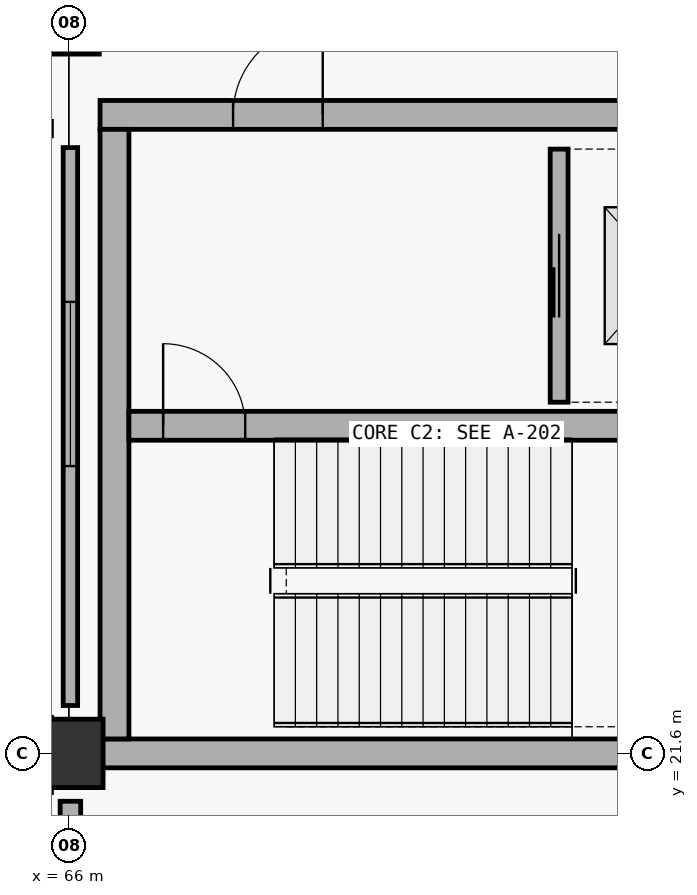
"""IFC4 building model, lengths in metres.
Left out: names, types, materials, properties, quantities, classifications, styles, units other than length and angle.
Written with IfcOpenShell. Run it as: python <this file> out.ifc"""

import sys

from ifc_helpers import new_model, si_unit, direction, frame, frame_2d, origin, origin_2d, place, context, subcontext, project, spatial, rectangle, extrude, element, fill, save


model = new_model("IFC4")
c1 = context("Model", 3, precision=1e-05, world=origin(), true_north=direction((0.0, 1.0)))
c2 = subcontext(c1, "Body", "Model", "MODEL_VIEW")
j1 = project(units=[si_unit("LENGTHUNIT", "METRE"), si_unit("PLANEANGLEUNIT", "RADIAN")], contexts=[c1])
p1 = place(None, origin())
s1 = spatial("IfcSite", under=j1, at=p1, CompositionType="ELEMENT")
p2 = place(p1, origin())
s2 = spatial("IfcBuilding", under=s1, at=p2, CompositionType="ELEMENT")
p3 = place(p2, frame((0.0, 0.0, 5.4)))
s3 = spatial("IfcBuildingStorey", under=s2, at=p3, CompositionType="ELEMENT", Elevation=5.4)
p4 = place(p3, frame((66.0, 21.6, 0.0), z_axis=(0.0, 0.0, 1.0), x_axis=(1.0, 0.0, 0.0)))
e1 = element("IfcColumn", 1, at=p4, inside=s3, PredefinedType="COLUMN", context=c2, shape_type="SweptSolid", body=[
    extrude(rectangle(XDim=0.9, YDim=0.9, at=origin_2d()), origin(), (0.0, 0.0, 1.0), 5.1),
])
p5 = place(p3, frame((66.0, 31.2, 0.0), z_axis=(0.0, 0.0, 1.0), x_axis=(1.0, 0.0, 0.0)))
e2 = element("IfcColumn", 2, at=p5, inside=s3, PredefinedType="COLUMN", context=c2, shape_type="SweptSolid", body=[
    extrude(rectangle(XDim=0.8, YDim=0.8, at=origin_2d()), origin(), (0.0, 0.0, 1.0), 5.1),
])
p6 = place(p3, frame((66.41, 21.6, 0.0), z_axis=(0.0, 0.0, 1.0), x_axis=(1.0, 0.0, 0.0)))
e3 = element("IfcWall", 3, at=p6, inside=s3, PredefinedType="SHEAR", context=c2, shape_type="SweptSolid", body=[
    extrude(rectangle(XDim=9.38, YDim=0.38, at=frame_2d((4.69, 0.0))), origin(), (0.0, 0.0, 1.0), 5.1),
])
p7 = place(p3, frame((66.41, 30.0, 0.0), z_axis=(0.0, 0.0, 1.0), x_axis=(1.0, 0.0, 0.0)))
e4 = element("IfcWall", 4, at=p7, inside=s3, PredefinedType="SHEAR", context=c2, shape_type="SweptSolid", body=[
    extrude(rectangle(XDim=9.38, YDim=0.38, at=frame_2d((4.69, 0.0))), origin(), (0.0, 0.0, 1.0), 5.1),
])
p8 = place(p7, frame((1.75, 0.0, 0.0)))
e5 = element("IfcOpeningElement", 5, at=p8, cuts=e4, PredefinedType="OPENING", context=c2, shape_type="SweptSolid", body=[
    extrude(rectangle(XDim=1.18, YDim=2.24, at=frame_2d((0.59, 1.12))), frame((0.0, 0.2, 0.0), z_axis=(0.0, -1.0, 0.0), x_axis=(1.0, 0.0, 0.0)), (0.0, 0.0, 1.0), 0.4),
])
p9 = place(p3, frame((66.6, 21.79, 0.0), z_axis=(0.0, 0.0, 1.0), x_axis=(0.0, 1.0, 0.0)))
e6 = element("IfcWall", 6, at=p9, inside=s3, PredefinedType="SHEAR", context=c2, shape_type="SweptSolid", body=[
    extrude(rectangle(XDim=8.02, YDim=0.38, at=frame_2d((4.01, 0.0))), origin(), (0.0, 0.0, 1.0), 5.1),
])
p10 = place(p3, frame((66.79, 25.91, 0.0), z_axis=(0.0, 0.0, 1.0), x_axis=(1.0, 0.0, 0.0)))
e7 = element("IfcWall", 7, at=p10, inside=s3, PredefinedType="SHEAR", context=c2, shape_type="SweptSolid", body=[
    extrude(rectangle(XDim=8.62, YDim=0.38, at=frame_2d((4.31, 0.0))), origin(), (0.0, 0.0, 1.0), 5.1),
])
p11 = place(p10, frame((0.45, 0.0, 0.0)))
e8 = element("IfcOpeningElement", 8, at=p11, cuts=e7, PredefinedType="OPENING", context=c2, shape_type="SweptSolid", body=[
    extrude(rectangle(XDim=1.08, YDim=2.18, at=frame_2d((0.54, 1.09))), frame((0.0, 0.2, 0.0), z_axis=(0.0, -1.0, 0.0), x_axis=(1.0, 0.0, 0.0)), (0.0, 0.0, 1.0), 0.4),
])
p12 = place(p3, frame((72.45, 26.22, 0.0), z_axis=(0.0, 0.0, 1.0), x_axis=(0.0, 1.0, 0.0)))
e9 = element("IfcWall", 9, at=p12, inside=s3, PredefinedType="PARTITIONING", context=c2, shape_type="SweptSolid", body=[
    extrude(rectangle(XDim=3.33, YDim=0.235, at=frame_2d((1.665, 0.0))), origin(), (0.0, 0.0, 1.0), 4.72),
])
p13 = place(p12, frame((1.115, 0.0, 0.0)))
e10 = element("IfcOpeningElement", 10, at=p13, cuts=e9, PredefinedType="OPENING", context=c2, shape_type="SweptSolid", body=[
    extrude(rectangle(XDim=1.1, YDim=2.2, at=frame_2d((0.55, 1.1))), frame((0.0, 0.127, 0.0), z_axis=(0.0, -1.0, 0.0), x_axis=(1.0, 0.0, 0.0)), (0.0, 0.0, 1.0), 0.255),
])
p14 = place(p3, frame((66.02, 22.23, 0.0), z_axis=(0.0, 0.0, 1.0), x_axis=(0.0, 1.0, 0.0)))
e11 = element("IfcWall", 11, at=p14, inside=s3, PredefinedType="PARTITIONING", context=c2, shape_type="SweptSolid", body=[
    extrude(rectangle(XDim=7.34, YDim=0.19, at=frame_2d((3.67, 0.0))), origin(), (0.0, 0.0, 1.0), 4.07),
])
p15 = place(p14, frame((3.15, 0.0, 0.9)))
e12 = element("IfcOpeningElement", 12, at=p15, cuts=e11, PredefinedType="OPENING", context=c2, shape_type="SweptSolid", body=[
    extrude(rectangle(XDim=2.16, YDim=1.42, at=frame_2d((1.08, 0.71))), frame((0.0, 0.105, 0.0), z_axis=(0.0, -1.0, 0.0), x_axis=(1.0, 0.0, 0.0)), (0.0, 0.0, 1.0), 0.21),
])
p16 = place(p3, frame((66.02, 18.03, 0.0), z_axis=(0.0, 0.0, 1.0), x_axis=(0.0, 1.0, 0.0)))
e13 = element("IfcWall", 13, at=p16, inside=s3, PredefinedType="PARTITIONING", context=c2, shape_type="SweptSolid", body=[
    extrude(rectangle(XDim=2.94, YDim=0.27, at=frame_2d((1.47, 0.0))), origin(), (0.0, 0.0, 1.0), 4.18),
])
p17 = place(p16, frame((0.4, 0.0, 0.9)))
e14 = element("IfcOpeningElement", 14, at=p17, cuts=e13, PredefinedType="OPENING", context=c2, shape_type="SweptSolid", body=[
    extrude(rectangle(XDim=1.72, YDim=1.46, at=frame_2d((0.86, 0.73))), frame((0.0, 0.145, 0.0), z_axis=(0.0, -1.0, 0.0), x_axis=(1.0, 0.0, 0.0)), (0.0, 0.0, 1.0), 0.29),
])
p18 = place(p11, origin())
e15 = element("IfcDoor", 15, at=p18, inside=s3, OperationType="SINGLE_SWING_LEFT", PredefinedType="DOOR", context=c2, shape_type="SweptSolid", body=[
    extrude(rectangle(XDim=1.08, YDim=2.18, at=frame_2d((0.54, 1.09))), frame((0.0, 0.025, 0.0), z_axis=(0.0, -1.0, 0.0), x_axis=(1.0, 0.0, 0.0)), (0.0, 0.0, 1.0), 0.05),
])
fill(e8, e15)
p19 = place(p8, origin())
e16 = element("IfcDoor", 16, at=p19, inside=s3, OperationType="SINGLE_SWING_RIGHT", PredefinedType="DOOR", context=c2, shape_type="SweptSolid", body=[
    extrude(rectangle(XDim=1.18, YDim=2.24, at=frame_2d((0.59, 1.12))), frame((0.0, 0.025, 0.0), z_axis=(0.0, -1.0, 0.0), x_axis=(1.0, 0.0, 0.0)), (0.0, 0.0, 1.0), 0.05),
])
fill(e5, e16)
p20 = place(p13, origin())
e17 = element("IfcDoor", 17, at=p20, inside=s3, OperationType="SLIDING_TO_LEFT", PredefinedType="DOOR", context=c2, shape_type="SweptSolid", body=[
    extrude(rectangle(XDim=1.1, YDim=2.2, at=frame_2d((0.55, 1.1))), frame((0.0, 0.025, 0.0), z_axis=(0.0, -1.0, 0.0), x_axis=(1.0, 0.0, 0.0)), (0.0, 0.0, 1.0), 0.05),
])
fill(e10, e17)
p21 = place(p15, origin())
e18 = element("IfcWindow", 18, at=p21, inside=s3, PartitioningType="SINGLE_PANEL", PredefinedType="WINDOW", context=c2, shape_type="SweptSolid", body=[
    extrude(rectangle(XDim=2.16, YDim=1.42, at=frame_2d((1.08, 0.71))), frame((0.0, 0.03, 0.0), z_axis=(0.0, -1.0, 0.0), x_axis=(1.0, 0.0, 0.0)), (0.0, 0.0, 1.0), 0.06),
])
fill(e12, e18)
save(model, sys.argv[1])
